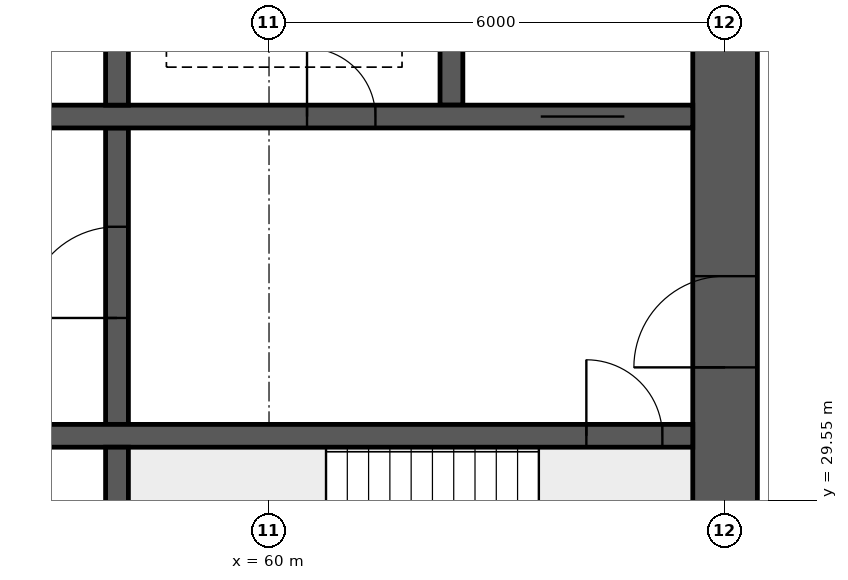
"""IFC4 building model, lengths in metres.
Left out: names, types, materials, properties, quantities, classifications, styles, units other than length and angle.
Written with IfcOpenShell. Run it as: python <this file> out.ifc"""

import sys

from ifc_helpers import new_model, si_unit, direction, frame, frame_2d, origin, place, context, subcontext, project, spatial, rectangle, extrude, element, fill, save


model = new_model("IFC4")
c1 = context("Model", 3, precision=1e-05, world=origin(), true_north=direction((0.0, 1.0)))
c2 = subcontext(c1, "Body", "Model", "MODEL_VIEW")
j1 = project(units=[si_unit("LENGTHUNIT", "METRE"), si_unit("PLANEANGLEUNIT", "RADIAN")], contexts=[c1])
p1 = place(None, origin())
s1 = spatial("IfcSite", under=j1, at=p1, CompositionType="ELEMENT")
p2 = place(p1, origin())
s2 = spatial("IfcBuilding", under=s1, at=p2, CompositionType="ELEMENT")
p3 = place(p2, frame((0.0, 0.0, 159.85)))
s3 = spatial("IfcBuildingStorey", under=s2, at=p3, CompositionType="ELEMENT", Elevation=159.85)
p4 = place(p3, frame((66.0, 26.225, 0.0), z_axis=(0.0, 0.0, 1.0), x_axis=(0.0, 1.0, 0.0)))
e1 = element("IfcWall", 1, at=p4, inside=s3, PredefinedType="SHEAR", context=c2, shape_type="SweptSolid", body=[
    extrude(rectangle(XDim=11.55, YDim=0.85, at=frame_2d((5.775, 0.0))), origin(), (0.0, 0.0, 1.0), 3.75),
])
p5 = place(p4, frame((5.075, 0.0, 0.0)))
e2 = element("IfcOpeningElement", 2, at=p5, cuts=e1, PredefinedType="OPENING", context=c2, shape_type="SweptSolid", body=[
    extrude(rectangle(XDim=1.2, YDim=2.1, at=frame_2d((0.6, 1.05))), frame((0.0, 0.435, 0.0), z_axis=(0.0, -1.0, 0.0), x_axis=(1.0, 0.0, 0.0)), (0.0, 0.0, 1.0), 0.87),
])
p6 = place(p3, frame((18.425, 30.4, 0.0), z_axis=(0.0, 0.0, 1.0), x_axis=(1.0, 0.0, 0.0)))
e3 = element("IfcWall", 3, at=p6, inside=s3, PredefinedType="SHEAR", context=c2, shape_type="SweptSolid", body=[
    extrude(rectangle(XDim=47.15, YDim=0.3, at=frame_2d((23.575, 0.0))), origin(), (0.0, 0.0, 1.0), 3.75),
])
p7 = place(p6, frame((0.4, 0.0, 0.0)))
e4 = element("IfcOpeningElement", 4, at=p7, cuts=e3, PredefinedType="OPENING", context=c2, shape_type="SweptSolid", body=[
    extrude(rectangle(XDim=1.0, YDim=2.1, at=frame_2d((0.5, 1.05))), frame((0.0, 0.16, 0.0), z_axis=(0.0, -1.0, 0.0), x_axis=(1.0, 0.0, 0.0)), (0.0, 0.0, 1.0), 0.32),
])
p8 = place(p6, frame((45.75, 0.0, 0.0)))
e5 = element("IfcOpeningElement", 5, at=p8, cuts=e3, PredefinedType="OPENING", context=c2, shape_type="SweptSolid", body=[
    extrude(rectangle(XDim=1.0, YDim=2.1, at=frame_2d((0.5, 1.05))), frame((0.0, 0.16, 0.0), z_axis=(0.0, -1.0, 0.0), x_axis=(1.0, 0.0, 0.0)), (0.0, 0.0, 1.0), 0.32),
])
p9 = place(p6, frame((8.325, 0.0, 0.0)))
e6 = element("IfcOpeningElement", 6, at=p9, cuts=e3, PredefinedType="OPENING", context=c2, shape_type="SweptSolid", body=[
    extrude(rectangle(XDim=1.1, YDim=2.1, at=frame_2d((0.55, 1.05))), frame((0.0, 0.16, 0.0), z_axis=(0.0, -1.0, 0.0), x_axis=(1.0, 0.0, 0.0)), (0.0, 0.0, 1.0), 0.32),
])
p10 = place(p6, frame((10.925, 0.0, 0.0)))
e7 = element("IfcOpeningElement", 7, at=p10, cuts=e3, PredefinedType="OPENING", context=c2, shape_type="SweptSolid", body=[
    extrude(rectangle(XDim=1.1, YDim=2.1, at=frame_2d((0.55, 1.05))), frame((0.0, 0.16, 0.0), z_axis=(0.0, -1.0, 0.0), x_axis=(1.0, 0.0, 0.0)), (0.0, 0.0, 1.0), 0.32),
])
p11 = place(p6, frame((13.525, 0.0, 0.0)))
e8 = element("IfcOpeningElement", 8, at=p11, cuts=e3, PredefinedType="OPENING", context=c2, shape_type="SweptSolid", body=[
    extrude(rectangle(XDim=1.1, YDim=2.1, at=frame_2d((0.55, 1.05))), frame((0.0, 0.16, 0.0), z_axis=(0.0, -1.0, 0.0), x_axis=(1.0, 0.0, 0.0)), (0.0, 0.0, 1.0), 0.32),
])
p12 = place(p6, frame((16.125, 0.0, 0.0)))
e9 = element("IfcOpeningElement", 9, at=p12, cuts=e3, PredefinedType="OPENING", context=c2, shape_type="SweptSolid", body=[
    extrude(rectangle(XDim=1.1, YDim=2.1, at=frame_2d((0.55, 1.05))), frame((0.0, 0.16, 0.0), z_axis=(0.0, -1.0, 0.0), x_axis=(1.0, 0.0, 0.0)), (0.0, 0.0, 1.0), 0.32),
])
p13 = place(p6, frame((18.9, 0.0, 0.0)))
e10 = element("IfcOpeningElement", 10, at=p13, cuts=e3, PredefinedType="OPENING", context=c2, shape_type="SweptSolid", body=[
    extrude(rectangle(XDim=0.9, YDim=2.1, at=frame_2d((0.45, 1.05))), frame((0.0, 0.16, 0.0), z_axis=(0.0, -1.0, 0.0), x_axis=(1.0, 0.0, 0.0)), (0.0, 0.0, 1.0), 0.32),
])
p14 = place(p6, frame((30.192, 0.0, 0.0)))
e11 = element("IfcOpeningElement", 11, at=p14, cuts=e3, PredefinedType="OPENING", context=c2, shape_type="SweptSolid", body=[
    extrude(rectangle(XDim=1.1, YDim=2.1, at=frame_2d((0.55, 1.05))), frame((0.0, 0.16, 0.0), z_axis=(0.0, -1.0, 0.0), x_axis=(1.0, 0.0, 0.0)), (0.0, 0.0, 1.0), 0.32),
])
p15 = place(p6, frame((33.725, 0.0, 0.0)))
e12 = element("IfcOpeningElement", 12, at=p15, cuts=e3, PredefinedType="OPENING", context=c2, shape_type="SweptSolid", body=[
    extrude(rectangle(XDim=1.1, YDim=2.1, at=frame_2d((0.55, 1.05))), frame((0.0, 0.16, 0.0), z_axis=(0.0, -1.0, 0.0), x_axis=(1.0, 0.0, 0.0)), (0.0, 0.0, 1.0), 0.32),
])
p16 = place(p6, frame((37.258, 0.0, 0.0)))
e13 = element("IfcOpeningElement", 13, at=p16, cuts=e3, PredefinedType="OPENING", context=c2, shape_type="SweptSolid", body=[
    extrude(rectangle(XDim=1.1, YDim=2.1, at=frame_2d((0.55, 1.05))), frame((0.0, 0.16, 0.0), z_axis=(0.0, -1.0, 0.0), x_axis=(1.0, 0.0, 0.0)), (0.0, 0.0, 1.0), 0.32),
])
p17 = place(p3, frame((18.425, 34.6, 0.0), z_axis=(0.0, 0.0, 1.0), x_axis=(1.0, 0.0, 0.0)))
e14 = element("IfcWall", 14, at=p17, inside=s3, PredefinedType="SHEAR", context=c2, shape_type="SweptSolid", body=[
    extrude(rectangle(XDim=47.15, YDim=0.3, at=frame_2d((23.575, 0.0))), origin(), (0.0, 0.0, 1.0), 3.75),
])
p18 = place(p17, frame((0.9, 0.0, 0.0)))
e15 = element("IfcOpeningElement", 15, at=p18, cuts=e14, PredefinedType="OPENING", context=c2, shape_type="SweptSolid", body=[
    extrude(rectangle(XDim=1.1, YDim=2.1, at=frame_2d((0.55, 1.05))), frame((0.0, 0.16, 0.0), z_axis=(0.0, -1.0, 0.0), x_axis=(1.0, 0.0, 0.0)), (0.0, 0.0, 1.0), 0.32),
])
p19 = place(p17, frame((45.15, 0.0, 0.0)))
e16 = element("IfcOpeningElement", 16, at=p19, cuts=e14, PredefinedType="OPENING", context=c2, shape_type="SweptSolid", body=[
    extrude(rectangle(XDim=1.1, YDim=2.1, at=frame_2d((0.55, 1.05))), frame((0.0, 0.16, 0.0), z_axis=(0.0, -1.0, 0.0), x_axis=(1.0, 0.0, 0.0)), (0.0, 0.0, 1.0), 0.32),
])
p20 = place(p17, frame((4.175, 0.0, 0.0)))
e17 = element("IfcOpeningElement", 17, at=p20, cuts=e14, PredefinedType="OPENING", context=c2, shape_type="SweptSolid", body=[
    extrude(rectangle(XDim=0.9, YDim=2.1, at=frame_2d((0.45, 1.05))), frame((0.0, 0.16, 0.0), z_axis=(0.0, -1.0, 0.0), x_axis=(1.0, 0.0, 0.0)), (0.0, 0.0, 1.0), 0.32),
])
p21 = place(p17, frame((42.075, 0.0, 0.0)))
e18 = element("IfcOpeningElement", 18, at=p21, cuts=e14, PredefinedType="OPENING", context=c2, shape_type="SweptSolid", body=[
    extrude(rectangle(XDim=0.9, YDim=2.1, at=frame_2d((0.45, 1.05))), frame((0.0, 0.16, 0.0), z_axis=(0.0, -1.0, 0.0), x_axis=(1.0, 0.0, 0.0)), (0.0, 0.0, 1.0), 0.32),
])
p22 = place(p17, frame((8.95, 0.0, 0.0)))
e19 = element("IfcOpeningElement", 19, at=p22, cuts=e14, PredefinedType="OPENING", context=c2, shape_type="SweptSolid", body=[
    extrude(rectangle(XDim=0.9, YDim=2.1, at=frame_2d((0.45, 1.05))), frame((0.0, 0.16, 0.0), z_axis=(0.0, -1.0, 0.0), x_axis=(1.0, 0.0, 0.0)), (0.0, 0.0, 1.0), 0.32),
])
p23 = place(p17, frame((12.924, 0.0, 0.0)))
e20 = element("IfcOpeningElement", 20, at=p23, cuts=e14, PredefinedType="OPENING", context=c2, shape_type="SweptSolid", body=[
    extrude(rectangle(XDim=0.9, YDim=2.1, at=frame_2d((0.45, 1.05))), frame((0.0, 0.16, 0.0), z_axis=(0.0, -1.0, 0.0), x_axis=(1.0, 0.0, 0.0)), (0.0, 0.0, 1.0), 0.32),
])
p24 = place(p17, frame((16.571, 0.0, 0.0)))
e21 = element("IfcOpeningElement", 21, at=p24, cuts=e14, PredefinedType="OPENING", context=c2, shape_type="SweptSolid", body=[
    extrude(rectangle(XDim=0.9, YDim=2.1, at=frame_2d((0.45, 1.05))), frame((0.0, 0.16, 0.0), z_axis=(0.0, -1.0, 0.0), x_axis=(1.0, 0.0, 0.0)), (0.0, 0.0, 1.0), 0.32),
])
p25 = place(p17, frame((20.33, 0.0, 0.0)))
e22 = element("IfcOpeningElement", 22, at=p25, cuts=e14, PredefinedType="OPENING", context=c2, shape_type="SweptSolid", body=[
    extrude(rectangle(XDim=0.9, YDim=2.1, at=frame_2d((0.45, 1.05))), frame((0.0, 0.16, 0.0), z_axis=(0.0, -1.0, 0.0), x_axis=(1.0, 0.0, 0.0)), (0.0, 0.0, 1.0), 0.32),
])
p26 = place(p17, frame((24.736, 0.0, 0.0)))
e23 = element("IfcOpeningElement", 23, at=p26, cuts=e14, PredefinedType="OPENING", context=c2, shape_type="SweptSolid", body=[
    extrude(rectangle(XDim=0.9, YDim=2.1, at=frame_2d((0.45, 1.05))), frame((0.0, 0.16, 0.0), z_axis=(0.0, -1.0, 0.0), x_axis=(1.0, 0.0, 0.0)), (0.0, 0.0, 1.0), 0.32),
])
p27 = place(p17, frame((27.533, 0.0, 0.0)))
e24 = element("IfcOpeningElement", 24, at=p27, cuts=e14, PredefinedType="OPENING", context=c2, shape_type="SweptSolid", body=[
    extrude(rectangle(XDim=0.9, YDim=2.1, at=frame_2d((0.45, 1.05))), frame((0.0, 0.16, 0.0), z_axis=(0.0, -1.0, 0.0), x_axis=(1.0, 0.0, 0.0)), (0.0, 0.0, 1.0), 0.32),
])
p28 = place(p17, frame((29.906, 0.0, 0.0)))
e25 = element("IfcOpeningElement", 25, at=p28, cuts=e14, PredefinedType="OPENING", context=c2, shape_type="SweptSolid", body=[
    extrude(rectangle(XDim=0.9, YDim=2.1, at=frame_2d((0.45, 1.05))), frame((0.0, 0.16, 0.0), z_axis=(0.0, -1.0, 0.0), x_axis=(1.0, 0.0, 0.0)), (0.0, 0.0, 1.0), 0.32),
])
p29 = place(p17, frame((35.376, 0.0, 0.0)))
e26 = element("IfcOpeningElement", 26, at=p29, cuts=e14, PredefinedType="OPENING", context=c2, shape_type="SweptSolid", body=[
    extrude(rectangle(XDim=0.9, YDim=2.1, at=frame_2d((0.45, 1.05))), frame((0.0, 0.16, 0.0), z_axis=(0.0, -1.0, 0.0), x_axis=(1.0, 0.0, 0.0)), (0.0, 0.0, 1.0), 0.32),
])
p30 = place(p3, frame((58.0, 26.225, 0.0), z_axis=(0.0, 0.0, 1.0), x_axis=(0.0, 1.0, 0.0)))
e27 = element("IfcWall", 27, at=p30, inside=s3, PredefinedType="SHEAR", context=c2, shape_type="SweptSolid", body=[
    extrude(rectangle(XDim=4.025, YDim=0.3, at=frame_2d((2.012, 0.0))), origin(), (0.0, 0.0, 1.0), 3.75),
])
p31 = place(p3, frame((58.0, 30.55, 0.0), z_axis=(0.0, 0.0, 1.0), x_axis=(0.0, 1.0, 0.0)))
e28 = element("IfcWall", 28, at=p31, inside=s3, PredefinedType="SHEAR", context=c2, shape_type="SweptSolid", body=[
    extrude(rectangle(XDim=3.9, YDim=0.3, at=frame_2d((1.95, 0.0))), origin(), (0.0, 0.0, 1.0), 3.75),
])
p32 = place(p31, frame((1.4, 0.0, 0.0)))
e29 = element("IfcOpeningElement", 29, at=p32, cuts=e28, PredefinedType="OPENING", context=c2, shape_type="SweptSolid", body=[
    extrude(rectangle(XDim=1.2, YDim=2.1, at=frame_2d((0.6, 1.05))), frame((0.0, 0.16, 0.0), z_axis=(0.0, -1.0, 0.0), x_axis=(1.0, 0.0, 0.0)), (0.0, 0.0, 1.0), 0.32),
])
for number, where, z_axis, x_axis in (
    (30, (62.4, 34.75, 0.0), (0.0, 0.0, 1.0), (0.0, 1.0, 0.0)),
    (31, (58.0, 34.75, 0.0), (0.0, 0.0, 1.0), (0.0, 1.0, 0.0)),
):
    element("IfcWall", number, at=place(p3, frame(where, z_axis=z_axis, x_axis=x_axis)), inside=s3, PredefinedType="SHEAR", context=c2, shape_type="SweptSolid", body=[
        extrude(rectangle(XDim=3.025, YDim=0.3, at=frame_2d((1.512, 0.0))), origin(), (0.0, 0.0, 1.0), 3.75),
    ])
p33 = place(p5, origin())
e32 = element("IfcDoor", 32, at=p33, inside=s3, OperationType="SINGLE_SWING_LEFT", PredefinedType="DOOR", context=c2, shape_type="SweptSolid", body=[
    extrude(rectangle(XDim=1.2, YDim=2.1, at=frame_2d((0.6, 1.05))), frame((0.0, 0.025, 0.0), z_axis=(0.0, -1.0, 0.0), x_axis=(1.0, 0.0, 0.0)), (0.0, 0.0, 1.0), 0.05),
])
fill(e2, e32)
p34 = place(p8, origin())
e33 = element("IfcDoor", 33, at=p34, inside=s3, OperationType="SINGLE_SWING_LEFT", PredefinedType="DOOR", context=c2, shape_type="SweptSolid", body=[
    extrude(rectangle(XDim=1.0, YDim=2.1, at=frame_2d((0.5, 1.05))), frame((0.0, 0.025, 0.0), z_axis=(0.0, -1.0, 0.0), x_axis=(1.0, 0.0, 0.0)), (0.0, 0.0, 1.0), 0.05),
])
fill(e5, e33)
p35 = place(p19, origin())
e34 = element("IfcDoor", 34, at=p35, inside=s3, OperationType="DOUBLE_DOOR_SLIDING", PredefinedType="DOOR", context=c2, shape_type="SweptSolid", body=[
    extrude(rectangle(XDim=1.1, YDim=2.1, at=frame_2d((0.55, 1.05))), frame((0.0, 0.025, 0.0), z_axis=(0.0, -1.0, 0.0), x_axis=(1.0, 0.0, 0.0)), (0.0, 0.0, 1.0), 0.05),
])
fill(e16, e34)
p36 = place(p21, origin())
e35 = element("IfcDoor", 35, at=p36, inside=s3, OperationType="SINGLE_SWING_LEFT", PredefinedType="DOOR", context=c2, shape_type="SweptSolid", body=[
    extrude(rectangle(XDim=0.9, YDim=2.1, at=frame_2d((0.45, 1.05))), frame((0.0, 0.025, 0.0), z_axis=(0.0, -1.0, 0.0), x_axis=(1.0, 0.0, 0.0)), (0.0, 0.0, 1.0), 0.05),
])
fill(e18, e35)
p37 = place(p32, origin())
e36 = element("IfcDoor", 36, at=p37, inside=s3, OperationType="SINGLE_SWING_LEFT", PredefinedType="DOOR", context=c2, shape_type="SweptSolid", body=[
    extrude(rectangle(XDim=1.2, YDim=2.1, at=frame_2d((0.6, 1.05))), frame((0.0, 0.025, 0.0), z_axis=(0.0, -1.0, 0.0), x_axis=(1.0, 0.0, 0.0)), (0.0, 0.0, 1.0), 0.05),
])
fill(e29, e36)
save(model, sys.argv[1])
